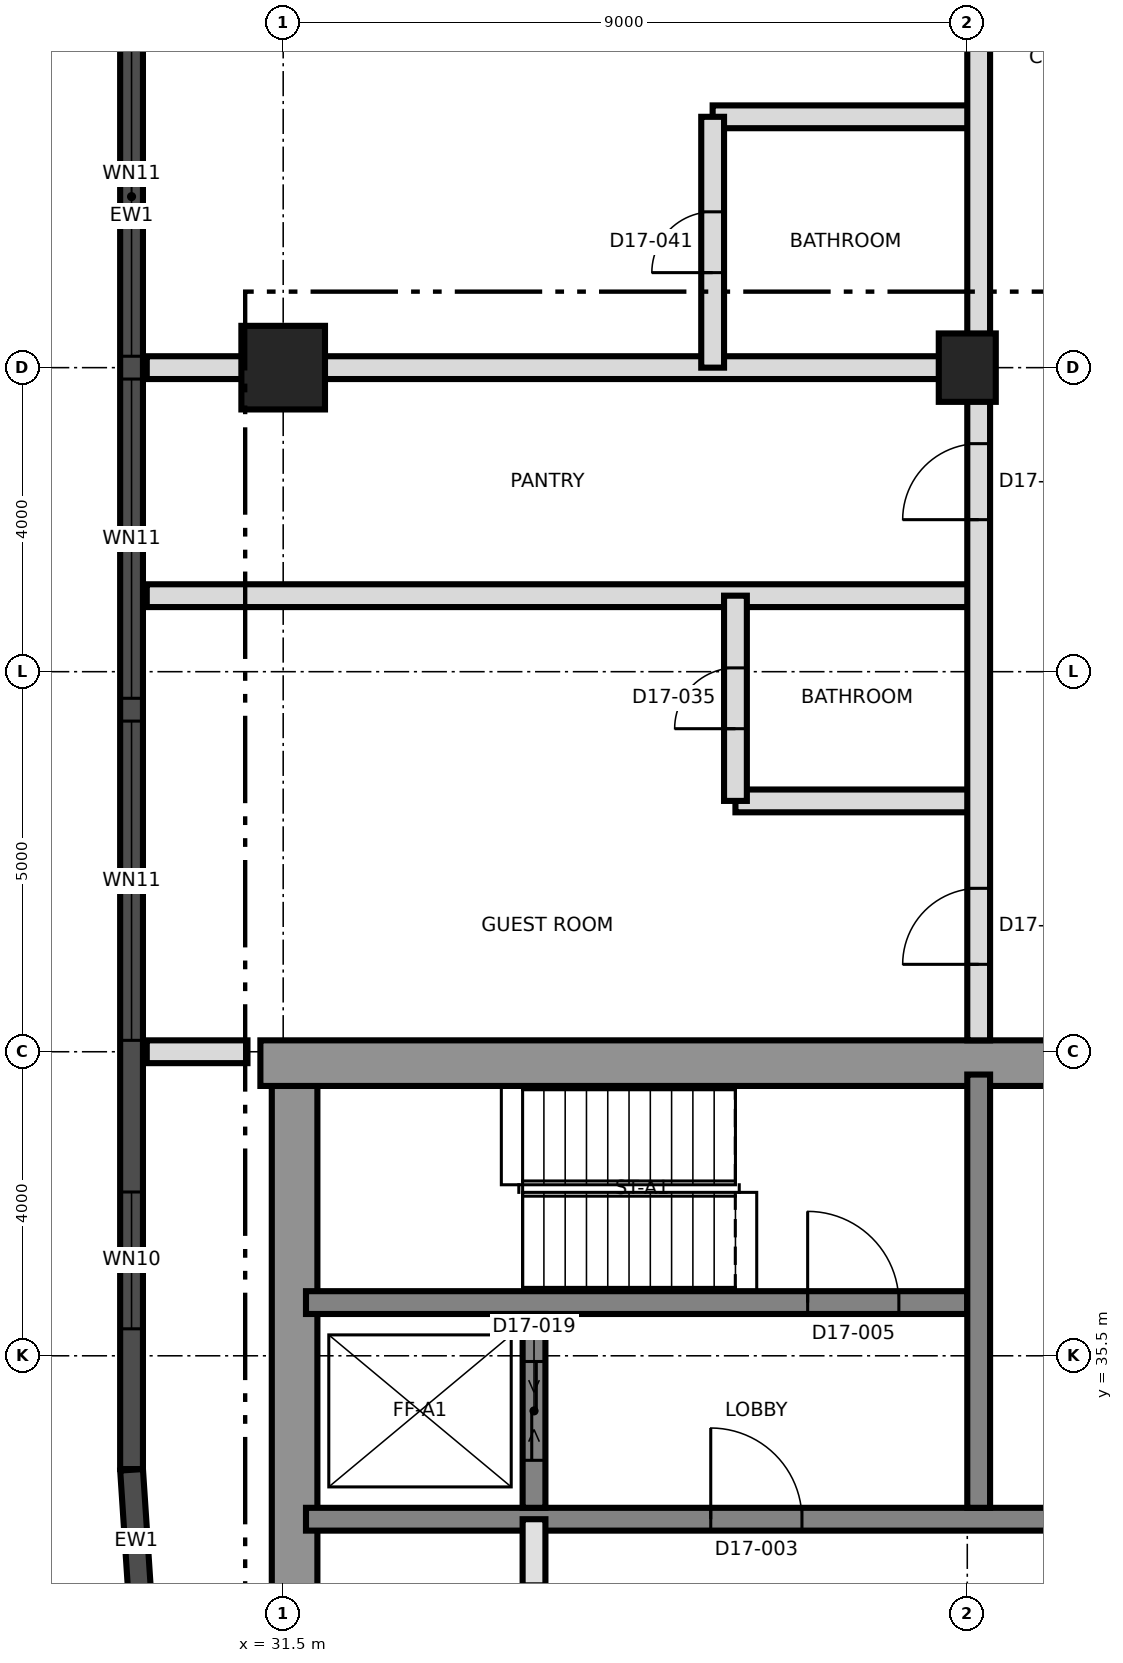
"""IFC4 building model, lengths in metres.
Left out: names, types, materials, properties, quantities, classifications, styles, units other than length and angle.
Written with IfcOpenShell. Run it as: python <this file> out.ifc"""

import sys

from ifc_helpers import new_model, si_unit, direction, frame, frame_2d, origin, origin_2d, place, context, subcontext, project, spatial, rectangle, extrude, element, fill, save


model = new_model("IFC4")
c1 = context("Model", 3, precision=1e-05, world=origin(), true_north=direction((0.0, 1.0)))
c2 = subcontext(c1, "Body", "Model", "MODEL_VIEW")
j1 = project(units=[si_unit("LENGTHUNIT", "METRE"), si_unit("PLANEANGLEUNIT", "RADIAN")], contexts=[c1])
p1 = place(None, origin())
s1 = spatial("IfcSite", under=j1, at=p1, CompositionType="ELEMENT")
p2 = place(p1, origin())
s2 = spatial("IfcBuilding", under=s1, at=p2, CompositionType="ELEMENT")
p3 = place(p2, frame((0.0, 0.0, 171.8)))
s3 = spatial("IfcBuildingStorey", under=s2, at=p3, CompositionType="ELEMENT", Elevation=171.8)
p4 = place(p3, frame((31.65, 21.8, 0.0), z_axis=(0.0, 0.0, 1.0), x_axis=(0.0, 1.0, 0.0)))
e1 = element("IfcWall", 1, at=p4, inside=s3, PredefinedType="SHEAR", context=c2, shape_type="SweptSolid", body=[
    extrude(rectangle(XDim=17.4, YDim=0.6, at=frame_2d((8.7, 0.0))), origin(), (0.0, 0.0, 1.0), 3.7),
])
p5 = place(p3, frame((31.2, 39.35, 0.0), z_axis=(0.0, 0.0, 1.0), x_axis=(1.0, 0.0, 0.0)))
e2 = element("IfcWall", 2, at=p5, inside=s3, PredefinedType="SHEAR", context=c2, shape_type="SweptSolid", body=[
    extrude(rectangle(XDim=27.0, YDim=0.6, at=frame_2d((13.5, 0.0))), origin(), (0.0, 0.0, 1.0), 3.7),
])
p6 = place(p5, frame((10.5, 0.0, 0.0)))
e3 = element("IfcOpeningElement", 3, at=p6, cuts=e2, PredefinedType="OPENING", context=c2, shape_type="SweptSolid", body=[
    extrude(rectangle(XDim=1.2, YDim=2.1, at=frame_2d((0.6, 1.05))), frame((0.0, 0.31, 0.0), z_axis=(0.0, -1.0, 0.0), x_axis=(1.0, 0.0, 0.0)), (0.0, 0.0, 1.0), 0.62),
])
p7 = place(p3, frame((31.8, 33.35, 0.0), z_axis=(0.0, 0.0, 1.0), x_axis=(1.0, 0.0, 0.0)))
e4 = element("IfcWall", 4, at=p7, inside=s3, PredefinedType="SHEAR", context=c2, shape_type="SweptSolid", body=[
    extrude(rectangle(XDim=26.4, YDim=0.3, at=frame_2d((13.2, 0.0))), origin(), (0.0, 0.0, 1.0), 3.7),
])
p8 = place(p7, frame((13.85, 0.0, 0.0)))
e5 = element("IfcOpeningElement", 5, at=p8, cuts=e4, PredefinedType="OPENING", context=c2, shape_type="SweptSolid", body=[
    extrude(rectangle(XDim=1.4, YDim=2.1, at=frame_2d((0.7, 1.05))), frame((0.0, 0.16, 0.0), z_axis=(0.0, -1.0, 0.0), x_axis=(1.0, 0.0, 0.0)), (0.0, 0.0, 1.0), 0.32),
])
p9 = place(p7, frame((5.325, 0.0, 0.0)))
e6 = element("IfcOpeningElement", 6, at=p9, cuts=e4, PredefinedType="OPENING", context=c2, shape_type="SweptSolid", body=[
    extrude(rectangle(XDim=1.2, YDim=2.1, at=frame_2d((0.6, 1.05))), frame((0.0, 0.16, 0.0), z_axis=(0.0, -1.0, 0.0), x_axis=(1.0, 0.0, 0.0)), (0.0, 0.0, 1.0), 0.32),
])
p10 = place(p7, frame((19.875, 0.0, 0.0)))
e7 = element("IfcOpeningElement", 7, at=p10, cuts=e4, PredefinedType="OPENING", context=c2, shape_type="SweptSolid", body=[
    extrude(rectangle(XDim=1.2, YDim=2.1, at=frame_2d((0.6, 1.05))), frame((0.0, 0.16, 0.0), z_axis=(0.0, -1.0, 0.0), x_axis=(1.0, 0.0, 0.0)), (0.0, 0.0, 1.0), 0.32),
])
p11 = place(p3, frame((31.8, 36.2, 0.0), z_axis=(0.0, 0.0, 1.0), x_axis=(1.0, 0.0, 0.0)))
e8 = element("IfcWall", 8, at=p11, inside=s3, PredefinedType="SHEAR", context=c2, shape_type="SweptSolid", body=[
    extrude(rectangle(XDim=8.7, YDim=0.3, at=frame_2d((4.35, 0.0))), origin(), (0.0, 0.0, 1.0), 3.7),
])
p12 = place(p11, frame((6.6, 0.0, 0.0)))
e9 = element("IfcOpeningElement", 9, at=p12, cuts=e8, PredefinedType="OPENING", context=c2, shape_type="SweptSolid", body=[
    extrude(rectangle(XDim=1.2, YDim=2.1, at=frame_2d((0.6, 1.05))), frame((0.0, 0.16, 0.0), z_axis=(0.0, -1.0, 0.0), x_axis=(1.0, 0.0, 0.0)), (0.0, 0.0, 1.0), 0.32),
])
p13 = place(p3, frame((40.65, 33.5, 0.0), z_axis=(0.0, 0.0, 1.0), x_axis=(0.0, 1.0, 0.0)))
e10 = element("IfcWall", 10, at=p13, inside=s3, PredefinedType="SHEAR", context=c2, shape_type="SweptSolid", body=[
    extrude(rectangle(XDim=5.7, YDim=0.3, at=frame_2d((2.85, 0.0))), origin(), (0.0, 0.0, 1.0), 3.7),
])
p14 = place(p3, frame((34.8, 33.5, 0.0), z_axis=(0.0, 0.0, 1.0), x_axis=(0.0, 1.0, 0.0)))
e11 = element("IfcWall", 11, at=p14, inside=s3, PredefinedType="SHEAR", context=c2, shape_type="SweptSolid", body=[
    extrude(rectangle(XDim=2.55, YDim=0.3, at=frame_2d((1.275, 0.0))), origin(), (0.0, 0.0, 1.0), 3.7),
])
p15 = place(p14, frame((0.625, 0.0, 0.0)))
e12 = element("IfcOpeningElement", 12, at=p15, cuts=e11, PredefinedType="OPENING", context=c2, shape_type="SweptSolid", body=[
    extrude(rectangle(XDim=1.3, YDim=2.4, at=frame_2d((0.65, 1.2))), frame((0.0, 0.16, 0.0), z_axis=(0.0, -1.0, 0.0), x_axis=(1.0, 0.0, 0.0)), (0.0, 0.0, 1.0), 0.32),
])
p16 = place(p3, frame((31.5, 48.5, 0.0), z_axis=(0.0, 0.0, 1.0), x_axis=(1.0, 0.0, 0.0)))
e13 = element("IfcColumn", 13, at=p16, inside=s3, PredefinedType="COLUMN", context=c2, shape_type="SweptSolid", body=[
    extrude(rectangle(XDim=1.1, YDim=1.1, at=origin_2d()), origin(), (0.0, 0.0, 1.0), 3.7),
])
p17 = place(p3, frame((40.5, 48.5, 0.0), z_axis=(0.0, 0.0, 1.0), x_axis=(0.0, 1.0, 0.0)))
e14 = element("IfcColumn", 14, at=p17, inside=s3, PredefinedType="COLUMN", context=c2, shape_type="SweptSolid", body=[
    extrude(rectangle(XDim=0.9, YDim=0.75, at=origin_2d()), origin(), (0.0, 0.0, 1.0), 3.7),
])
p18 = place(p3, frame((29.505, 66.986, 0.0), z_axis=(0.0, 0.0, 1.0), x_axis=(0.0, -1.0, 0.0)))
e15 = element("IfcWall", 15, at=p18, inside=s3, PredefinedType="SOLIDWALL", context=c2, shape_type="SweptSolid", body=[
    extrude(rectangle(XDim=32.976, YDim=0.3, at=frame_2d((16.488, 0.0))), origin(), (0.0, 0.0, 1.0), 3.4),
])
p19 = place(p18, frame((1.593, 0.0, 0.3)))
e16 = element("IfcOpeningElement", 16, at=p19, cuts=e15, PredefinedType="OPENING", context=c2, shape_type="SweptSolid", body=[
    extrude(rectangle(XDim=1.8, YDim=2.4, at=frame_2d((0.9, 1.2))), frame((0.0, 0.16, 0.0), z_axis=(0.0, -1.0, 0.0), x_axis=(1.0, 0.0, 0.0)), (0.0, 0.0, 1.0), 0.32),
])
p20 = place(p18, frame((5.136, 0.0, 0.9)))
e17 = element("IfcOpeningElement", 17, at=p20, cuts=e15, PredefinedType="OPENING", context=c2, shape_type="SweptSolid", body=[
    extrude(rectangle(XDim=4.2, YDim=1.5, at=frame_2d((2.1, 0.75))), frame((0.0, 0.16, 0.0), z_axis=(0.0, -1.0, 0.0), x_axis=(1.0, 0.0, 0.0)), (0.0, 0.0, 1.0), 0.32),
])
p21 = place(p18, frame((9.636, 0.0, 0.9)))
e18 = element("IfcOpeningElement", 18, at=p21, cuts=e15, PredefinedType="OPENING", context=c2, shape_type="SweptSolid", body=[
    extrude(rectangle(XDim=4.2, YDim=1.5, at=frame_2d((2.1, 0.75))), frame((0.0, 0.16, 0.0), z_axis=(0.0, -1.0, 0.0), x_axis=(1.0, 0.0, 0.0)), (0.0, 0.0, 1.0), 0.32),
])
p22 = place(p18, frame((14.136, 0.0, 0.9)))
e19 = element("IfcOpeningElement", 19, at=p22, cuts=e15, PredefinedType="OPENING", context=c2, shape_type="SweptSolid", body=[
    extrude(rectangle(XDim=4.2, YDim=1.5, at=frame_2d((2.1, 0.75))), frame((0.0, 0.16, 0.0), z_axis=(0.0, -1.0, 0.0), x_axis=(1.0, 0.0, 0.0)), (0.0, 0.0, 1.0), 0.32),
])
p23 = place(p18, frame((18.636, 0.0, 0.9)))
e20 = element("IfcOpeningElement", 20, at=p23, cuts=e15, PredefinedType="OPENING", context=c2, shape_type="SweptSolid", body=[
    extrude(rectangle(XDim=4.2, YDim=1.5, at=frame_2d((2.1, 0.75))), frame((0.0, 0.16, 0.0), z_axis=(0.0, -1.0, 0.0), x_axis=(1.0, 0.0, 0.0)), (0.0, 0.0, 1.0), 0.32),
])
p24 = place(p18, frame((23.136, 0.0, 0.9)))
e21 = element("IfcOpeningElement", 21, at=p24, cuts=e15, PredefinedType="OPENING", context=c2, shape_type="SweptSolid", body=[
    extrude(rectangle(XDim=4.2, YDim=1.5, at=frame_2d((2.1, 0.75))), frame((0.0, 0.16, 0.0), z_axis=(0.0, -1.0, 0.0), x_axis=(1.0, 0.0, 0.0)), (0.0, 0.0, 1.0), 0.32),
])
p25 = place(p18, frame((29.331, 0.0, 0.3)))
e22 = element("IfcOpeningElement", 22, at=p25, cuts=e15, PredefinedType="OPENING", context=c2, shape_type="SweptSolid", body=[
    extrude(rectangle(XDim=1.8, YDim=2.4, at=frame_2d((0.9, 1.2))), frame((0.0, 0.16, 0.0), z_axis=(0.0, -1.0, 0.0), x_axis=(1.0, 0.0, 0.0)), (0.0, 0.0, 1.0), 0.32),
])
p26 = place(p3, frame((29.505, 34.0, 0.0), z_axis=(0.0, 0.0, 1.0), x_axis=(0.065367742534, -0.997861241975, 0.0)))
e23 = element("IfcWall", 23, at=p26, inside=s3, PredefinedType="SOLIDWALL", context=c2, shape_type="SweptSolid", body=[
    extrude(rectangle(XDim=1.886, YDim=0.3, at=frame_2d((0.943, 0.0))), origin(), (0.0, 0.0, 1.0), 3.4),
])
p27 = place(p3, frame((34.8, 30.65, 0.0), z_axis=(0.0, 0.0, 1.0), x_axis=(0.0, 1.0, 0.0)))
e24 = element("IfcWall", 24, at=p27, inside=s3, PredefinedType="SOLIDWALL", context=c2, shape_type="SweptSolid", body=[
    extrude(rectangle(XDim=2.7, YDim=0.3, at=frame_2d((1.35, 0.0))), origin(), (0.0, 0.0, 1.0), 3.4),
])
p28 = place(p27, frame((0.85, 0.0, 0.0)))
e25 = element("IfcOpeningElement", 25, at=p28, cuts=e24, PredefinedType="OPENING", context=c2, shape_type="SweptSolid", body=[
    extrude(rectangle(XDim=1.0, YDim=2.1, at=frame_2d((0.5, 1.05))), frame((0.0, 0.16, 0.0), z_axis=(0.0, -1.0, 0.0), x_axis=(1.0, 0.0, 0.0)), (0.0, 0.0, 1.0), 0.32),
])
p29 = place(p3, frame((29.705, 39.5, 0.0), z_axis=(0.0, 0.0, 1.0), x_axis=(1.0, 0.0, 0.0)))
e26 = element("IfcWall", 26, at=p29, inside=s3, PredefinedType="PARTITIONING", context=c2, shape_type="SweptSolid", body=[
    extrude(rectangle(XDim=1.325, YDim=0.3, at=frame_2d((0.663, 0.0))), origin(), (0.0, 0.0, 1.0), 3.4),
])
p30 = place(p3, frame((37.45, 42.8, 0.0), z_axis=(0.0, 0.0, 1.0), x_axis=(1.0, 0.0, 0.0)))
e27 = element("IfcWall", 27, at=p30, inside=s3, PredefinedType="PARTITIONING", context=c2, shape_type="SweptSolid", body=[
    extrude(rectangle(XDim=3.2, YDim=0.3, at=frame_2d((1.6, 0.0))), origin(), (0.0, 0.0, 1.0), 3.4),
])
for number, where, z_axis, x_axis in (
    (28, (29.705, 45.5, 0.0), (0.0, 0.0, 1.0), (1.0, 0.0, 0.0)),
    (29, (29.705, 48.5, 0.0), (0.0, 0.0, 1.0), (1.0, 0.0, 0.0)),
):
    element("IfcWall", number, at=place(p3, frame(where, z_axis=z_axis, x_axis=x_axis)), inside=s3, PredefinedType="PARTITIONING", context=c2, shape_type="SweptSolid", body=[
        extrude(rectangle(XDim=10.945, YDim=0.3, at=frame_2d((5.472, 0.0))), origin(), (0.0, 0.0, 1.0), 3.4),
    ])
p31 = place(p3, frame((37.15, 51.8, 0.0), z_axis=(0.0, 0.0, 1.0), x_axis=(1.0, 0.0, 0.0)))
e30 = element("IfcWall", 30, at=p31, inside=s3, PredefinedType="PARTITIONING", context=c2, shape_type="SweptSolid", body=[
    extrude(rectangle(XDim=3.5, YDim=0.3, at=frame_2d((1.75, 0.0))), origin(), (0.0, 0.0, 1.0), 3.4),
])
p32 = place(p3, frame((37.15, 48.5, 0.0), z_axis=(0.0, 0.0, 1.0), x_axis=(0.0, 1.0, 0.0)))
e31 = element("IfcWall", 31, at=p32, inside=s3, PredefinedType="PARTITIONING", context=c2, shape_type="SweptSolid", body=[
    extrude(rectangle(XDim=3.3, YDim=0.3, at=frame_2d((1.65, 0.0))), origin(), (0.0, 0.0, 1.0), 3.4),
])
p33 = place(p32, frame((1.25, 0.0, 0.0)))
e32 = element("IfcOpeningElement", 32, at=p33, cuts=e31, PredefinedType="OPENING", context=c2, shape_type="SweptSolid", body=[
    extrude(rectangle(XDim=0.8, YDim=2.1, at=frame_2d((0.4, 1.05))), frame((0.0, 0.16, 0.0), z_axis=(0.0, -1.0, 0.0), x_axis=(1.0, 0.0, 0.0)), (0.0, 0.0, 1.0), 0.32),
])
p34 = place(p3, frame((37.45, 42.8, 0.0), z_axis=(0.0, 0.0, 1.0), x_axis=(0.0, 1.0, 0.0)))
e33 = element("IfcWall", 33, at=p34, inside=s3, PredefinedType="PARTITIONING", context=c2, shape_type="SweptSolid", body=[
    extrude(rectangle(XDim=2.7, YDim=0.3, at=frame_2d((1.35, 0.0))), origin(), (0.0, 0.0, 1.0), 3.4),
])
p35 = place(p34, frame((0.95, 0.0, 0.0)))
e34 = element("IfcOpeningElement", 34, at=p35, cuts=e33, PredefinedType="OPENING", context=c2, shape_type="SweptSolid", body=[
    extrude(rectangle(XDim=0.8, YDim=2.1, at=frame_2d((0.4, 1.05))), frame((0.0, 0.16, 0.0), z_axis=(0.0, -1.0, 0.0), x_axis=(1.0, 0.0, 0.0)), (0.0, 0.0, 1.0), 0.32),
])
p36 = place(p3, frame((40.65, 39.65, 0.0), z_axis=(0.0, 0.0, 1.0), x_axis=(0.0, 1.0, 0.0)))
e35 = element("IfcWall", 35, at=p36, inside=s3, PredefinedType="PARTITIONING", context=c2, shape_type="SweptSolid", body=[
    extrude(rectangle(XDim=37.35, YDim=0.3, at=frame_2d((18.675, 0.0))), origin(), (0.0, 0.0, 1.0), 3.4),
])
p37 = place(p36, frame((1.0, 0.0, 0.0)))
e36 = element("IfcOpeningElement", 36, at=p37, cuts=e35, PredefinedType="OPENING", context=c2, shape_type="SweptSolid", body=[
    extrude(rectangle(XDim=1.0, YDim=2.1, at=frame_2d((0.5, 1.05))), frame((0.0, 0.16, 0.0), z_axis=(0.0, -1.0, 0.0), x_axis=(1.0, 0.0, 0.0)), (0.0, 0.0, 1.0), 0.32),
])
p38 = place(p36, frame((6.85, 0.0, 0.0)))
e37 = element("IfcOpeningElement", 37, at=p38, cuts=e35, PredefinedType="OPENING", context=c2, shape_type="SweptSolid", body=[
    extrude(rectangle(XDim=1.0, YDim=2.1, at=frame_2d((0.5, 1.05))), frame((0.0, 0.16, 0.0), z_axis=(0.0, -1.0, 0.0), x_axis=(1.0, 0.0, 0.0)), (0.0, 0.0, 1.0), 0.32),
])
p39 = place(p36, frame((14.5, 0.0, 0.0)))
e38 = element("IfcOpeningElement", 38, at=p39, cuts=e35, PredefinedType="OPENING", context=c2, shape_type="SweptSolid", body=[
    extrude(rectangle(XDim=1.0, YDim=2.4, at=frame_2d((0.5, 1.2))), frame((0.0, 0.16, 0.0), z_axis=(0.0, -1.0, 0.0), x_axis=(1.0, 0.0, 0.0)), (0.0, 0.0, 1.0), 0.32),
])
p40 = place(p36, frame((21.35, 0.0, 0.0)))
e39 = element("IfcOpeningElement", 39, at=p40, cuts=e35, PredefinedType="OPENING", context=c2, shape_type="SweptSolid", body=[
    extrude(rectangle(XDim=1.0, YDim=2.4, at=frame_2d((0.5, 1.2))), frame((0.0, 0.16, 0.0), z_axis=(0.0, -1.0, 0.0), x_axis=(1.0, 0.0, 0.0)), (0.0, 0.0, 1.0), 0.32),
])
p41 = place(p22, origin())
e40 = element("IfcWindow", 40, at=p41, inside=s3, PartitioningType="SINGLE_PANEL", PredefinedType="WINDOW", context=c2, shape_type="SweptSolid", body=[
    extrude(rectangle(XDim=4.2, YDim=1.5, at=frame_2d((2.1, 0.75))), frame((0.0, 0.03, 0.0), z_axis=(0.0, -1.0, 0.0), x_axis=(1.0, 0.0, 0.0)), (0.0, 0.0, 1.0), 0.06),
])
fill(e19, e40)
p42 = place(p23, origin())
e41 = element("IfcWindow", 41, at=p42, inside=s3, PartitioningType="SINGLE_PANEL", PredefinedType="WINDOW", context=c2, shape_type="SweptSolid", body=[
    extrude(rectangle(XDim=4.2, YDim=1.5, at=frame_2d((2.1, 0.75))), frame((0.0, 0.03, 0.0), z_axis=(0.0, -1.0, 0.0), x_axis=(1.0, 0.0, 0.0)), (0.0, 0.0, 1.0), 0.06),
])
fill(e20, e41)
p43 = place(p24, origin())
e42 = element("IfcWindow", 42, at=p43, inside=s3, PartitioningType="SINGLE_PANEL", PredefinedType="WINDOW", context=c2, shape_type="SweptSolid", body=[
    extrude(rectangle(XDim=4.2, YDim=1.5, at=frame_2d((2.1, 0.75))), frame((0.0, 0.03, 0.0), z_axis=(0.0, -1.0, 0.0), x_axis=(1.0, 0.0, 0.0)), (0.0, 0.0, 1.0), 0.06),
])
fill(e21, e42)
p44 = place(p25, origin())
e43 = element("IfcWindow", 43, at=p44, inside=s3, PartitioningType="SINGLE_PANEL", PredefinedType="WINDOW", context=c2, shape_type="SweptSolid", body=[
    extrude(rectangle(XDim=1.8, YDim=2.4, at=frame_2d((0.9, 1.2))), frame((0.0, 0.03, 0.0), z_axis=(0.0, -1.0, 0.0), x_axis=(1.0, 0.0, 0.0)), (0.0, 0.0, 1.0), 0.06),
])
fill(e22, e43)
p45 = place(p9, origin())
e44 = element("IfcDoor", 44, at=p45, inside=s3, OperationType="SINGLE_SWING_LEFT", PredefinedType="DOOR", context=c2, shape_type="SweptSolid", body=[
    extrude(rectangle(XDim=1.2, YDim=2.1, at=frame_2d((0.6, 1.05))), frame((0.0, 0.025, 0.0), z_axis=(0.0, -1.0, 0.0), x_axis=(1.0, 0.0, 0.0)), (0.0, 0.0, 1.0), 0.05),
])
fill(e6, e44)
p46 = place(p12, origin())
e45 = element("IfcDoor", 45, at=p46, inside=s3, OperationType="SINGLE_SWING_RIGHT", PredefinedType="DOOR", context=c2, shape_type="SweptSolid", body=[
    extrude(rectangle(XDim=1.2, YDim=2.1, at=frame_2d((0.6, 1.05))), frame((0.0, 0.025, 0.0), z_axis=(0.0, -1.0, 0.0), x_axis=(1.0, 0.0, 0.0)), (0.0, 0.0, 1.0), 0.05),
])
fill(e9, e45)
p47 = place(p15, origin())
e46 = element("IfcDoor", 46, at=p47, inside=s3, OperationType="SLIDING_TO_LEFT", PredefinedType="DOOR", context=c2, shape_type="SweptSolid", body=[
    extrude(rectangle(XDim=1.3, YDim=2.4, at=frame_2d((0.65, 1.2))), frame((0.0, 0.025, 0.0), z_axis=(0.0, -1.0, 0.0), x_axis=(1.0, 0.0, 0.0)), (0.0, 0.0, 1.0), 0.05),
])
fill(e12, e46)
p48 = place(p35, origin())
e47 = element("IfcDoor", 47, at=p48, inside=s3, OperationType="SINGLE_SWING_LEFT", PredefinedType="DOOR", context=c2, shape_type="SweptSolid", body=[
    extrude(rectangle(XDim=0.8, YDim=2.1, at=frame_2d((0.4, 1.05))), frame((0.0, 0.025, 0.0), z_axis=(0.0, -1.0, 0.0), x_axis=(1.0, 0.0, 0.0)), (0.0, 0.0, 1.0), 0.05),
])
fill(e34, e47)
p49 = place(p37, origin())
e48 = element("IfcDoor", 48, at=p49, inside=s3, OperationType="SINGLE_SWING_LEFT", PredefinedType="DOOR", context=c2, shape_type="SweptSolid", body=[
    extrude(rectangle(XDim=1.0, YDim=2.1, at=frame_2d((0.5, 1.05))), frame((0.0, 0.025, 0.0), z_axis=(0.0, -1.0, 0.0), x_axis=(1.0, 0.0, 0.0)), (0.0, 0.0, 1.0), 0.05),
])
fill(e36, e48)
p50 = place(p38, origin())
e49 = element("IfcDoor", 49, at=p50, inside=s3, OperationType="SINGLE_SWING_RIGHT", PredefinedType="DOOR", context=c2, shape_type="SweptSolid", body=[
    extrude(rectangle(XDim=1.0, YDim=2.1, at=frame_2d((0.5, 1.05))), frame((0.0, 0.025, 0.0), z_axis=(0.0, -1.0, 0.0), x_axis=(1.0, 0.0, 0.0)), (0.0, 0.0, 1.0), 0.05),
])
fill(e37, e49)
p51 = place(p33, origin())
e50 = element("IfcDoor", 50, at=p51, inside=s3, OperationType="SINGLE_SWING_LEFT", PredefinedType="DOOR", context=c2, shape_type="SweptSolid", body=[
    extrude(rectangle(XDim=0.8, YDim=2.1, at=frame_2d((0.4, 1.05))), frame((0.0, 0.025, 0.0), z_axis=(0.0, -1.0, 0.0), x_axis=(1.0, 0.0, 0.0)), (0.0, 0.0, 1.0), 0.05),
])
fill(e32, e50)
save(model, sys.argv[1])
